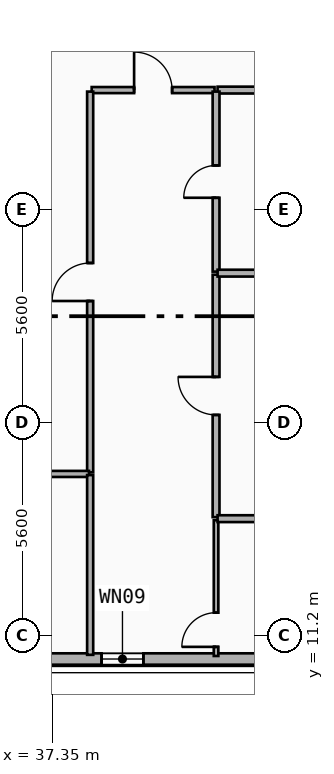
"""IFC4 building model, lengths in metres.
Left out: names, types, materials, properties, quantities, classifications, styles, units other than length and angle.
Written with IfcOpenShell. Run it as: python <this file> out.ifc"""

import sys

from ifc_helpers import new_model, si_unit, direction, frame, frame_2d, origin, place, context, subcontext, project, spatial, rectangle, extrude, element, fill, save


model = new_model("IFC4")
c1 = context("Model", 3, precision=1e-05, world=origin(), true_north=direction((0.0, 1.0)))
c2 = subcontext(c1, "Body", "Model", "MODEL_VIEW")
j1 = project(units=[si_unit("LENGTHUNIT", "METRE"), si_unit("PLANEANGLEUNIT", "RADIAN")], contexts=[c1])
p1 = place(None, origin())
s1 = spatial("IfcSite", under=j1, at=p1, CompositionType="ELEMENT")
p2 = place(p1, origin())
s2 = spatial("IfcBuilding", under=s1, at=p2, CompositionType="ELEMENT")
p3 = place(p2, frame((0.0, 0.0, 144.8)))
s3 = spatial("IfcBuildingStorey", under=s2, at=p3, CompositionType="ELEMENT", Elevation=144.8)
p4 = place(p3, frame((48.0, 10.58, 0.0), z_axis=(0.0, 0.0, 1.0), x_axis=(-1.0, 0.0, 0.0)))
e1 = element("IfcWall", 1, at=p4, inside=s3, PredefinedType="SOLIDWALL", context=c2, shape_type="SweptSolid", body=[
    extrude(rectangle(XDim=38.4, YDim=0.3, at=frame_2d((19.2, 0.0))), origin(), (0.0, 0.0, 1.0), 3.29),
])
p5 = place(p4, frame((36.19, 0.0, 0.34)))
e2 = element("IfcOpeningElement", 2, at=p5, cuts=e1, PredefinedType="OPENING", context=c2, shape_type="SweptSolid", body=[
    extrude(rectangle(XDim=1.8, YDim=1.8, at=frame_2d((0.9, 0.9))), frame((0.0, 0.16, 0.0), z_axis=(0.0, -1.0, 0.0), x_axis=(1.0, 0.0, 0.0)), (0.0, 0.0, 1.0), 0.32),
])
p6 = place(p4, frame((27.938, 0.0, 0.34)))
e3 = element("IfcOpeningElement", 3, at=p6, cuts=e1, PredefinedType="OPENING", context=c2, shape_type="SweptSolid", body=[
    extrude(rectangle(XDim=1.2, YDim=1.5, at=frame_2d((0.6, 0.75))), frame((0.0, 0.16, 0.0), z_axis=(0.0, -1.0, 0.0), x_axis=(1.0, 0.0, 0.0)), (0.0, 0.0, 1.0), 0.32),
])
p7 = place(p4, frame((25.719, 0.0, 0.34)))
e4 = element("IfcOpeningElement", 4, at=p7, cuts=e1, PredefinedType="OPENING", context=c2, shape_type="SweptSolid", body=[
    extrude(rectangle(XDim=1.4, YDim=1.8, at=frame_2d((0.7, 0.9))), frame((0.0, 0.16, 0.0), z_axis=(0.0, -1.0, 0.0), x_axis=(1.0, 0.0, 0.0)), (0.0, 0.0, 1.0), 0.32),
])
p8 = place(p4, frame((33.861, 0.0, 1.22)))
e5 = element("IfcOpeningElement", 5, at=p8, cuts=e1, PredefinedType="OPENING", context=c2, shape_type="SweptSolid", body=[
    extrude(rectangle(XDim=1.2, YDim=1.5, at=frame_2d((0.6, 0.75))), frame((0.0, 0.16, 0.0), z_axis=(0.0, -1.0, 0.0), x_axis=(1.0, 0.0, 0.0)), (0.0, 0.0, 1.0), 0.32),
])
p9 = place(p4, frame((20.1, 0.0, 0.65)))
e6 = element("IfcOpeningElement", 6, at=p9, cuts=e1, PredefinedType="OPENING", context=c2, shape_type="SweptSolid", body=[
    extrude(rectangle(XDim=2.1, YDim=2.1, at=frame_2d((1.05, 1.05))), frame((0.0, 0.16, 0.0), z_axis=(0.0, -1.0, 0.0), x_axis=(1.0, 0.0, 0.0)), (0.0, 0.0, 1.0), 0.32),
])
p10 = place(p4, frame((22.95, 0.0, 0.8)))
e7 = element("IfcOpeningElement", 7, at=p10, cuts=e1, PredefinedType="OPENING", context=c2, shape_type="SweptSolid", body=[
    extrude(rectangle(XDim=1.8, YDim=1.8, at=frame_2d((0.9, 0.9))), frame((0.0, 0.16, 0.0), z_axis=(0.0, -1.0, 0.0), x_axis=(1.0, 0.0, 0.0)), (0.0, 0.0, 1.0), 0.32),
])
p11 = place(p4, frame((13.35, 0.0, 0.65)))
e8 = element("IfcOpeningElement", 8, at=p11, cuts=e1, PredefinedType="OPENING", context=c2, shape_type="SweptSolid", body=[
    extrude(rectangle(XDim=2.1, YDim=2.1, at=frame_2d((1.05, 1.05))), frame((0.0, 0.16, 0.0), z_axis=(0.0, -1.0, 0.0), x_axis=(1.0, 0.0, 0.0)), (0.0, 0.0, 1.0), 0.32),
])
p12 = place(p4, frame((8.25, 0.0, 1.68)))
e9 = element("IfcOpeningElement", 9, at=p12, cuts=e1, PredefinedType="OPENING", context=c2, shape_type="SweptSolid", body=[
    extrude(rectangle(XDim=1.1, YDim=1.05, at=frame_2d((0.55, 0.525))), frame((0.0, 0.16, 0.0), z_axis=(0.0, -1.0, 0.0), x_axis=(1.0, 0.0, 0.0)), (0.0, 0.0, 1.0), 0.32),
])
p13 = place(p4, frame((2.9, 0.0, 0.34)))
e10 = element("IfcOpeningElement", 10, at=p13, cuts=e1, PredefinedType="OPENING", context=c2, shape_type="SweptSolid", body=[
    extrude(rectangle(XDim=1.4, YDim=1.8, at=frame_2d((0.7, 0.9))), frame((0.0, 0.16, 0.0), z_axis=(0.0, -1.0, 0.0), x_axis=(1.0, 0.0, 0.0)), (0.0, 0.0, 1.0), 0.32),
])
p14 = place(p4, frame((0.41, 0.0, 0.34)))
e11 = element("IfcOpeningElement", 11, at=p14, cuts=e1, PredefinedType="OPENING", context=c2, shape_type="SweptSolid", body=[
    extrude(rectangle(XDim=1.8, YDim=1.8, at=frame_2d((0.9, 0.9))), frame((0.0, 0.16, 0.0), z_axis=(0.0, -1.0, 0.0), x_axis=(1.0, 0.0, 0.0)), (0.0, 0.0, 1.0), 0.32),
])
p15 = place(p3, frame((38.39, 25.55, 0.0), z_axis=(0.0, 0.0, 1.0), x_axis=(1.0, 0.0, 0.0)))
e12 = element("IfcWall", 12, at=p15, inside=s3, PredefinedType="PARTITIONING", context=c2, shape_type="SweptSolid", body=[
    extrude(rectangle(XDim=3.233, YDim=0.16, at=frame_2d((1.617, 0.0))), origin(), (0.0, 0.0, 1.0), 3.29),
])
p16 = place(p15, frame((1.116, 0.0, 0.0)))
e13 = element("IfcOpeningElement", 13, at=p16, cuts=e12, PredefinedType="OPENING", context=c2, shape_type="SweptSolid", body=[
    extrude(rectangle(XDim=1.0, YDim=2.15, at=frame_2d((0.5, 1.075))), frame((0.0, 0.09, 0.0), z_axis=(0.0, -1.0, 0.0), x_axis=(1.0, 0.0, 0.0)), (0.0, 0.0, 1.0), 0.18),
])
p17 = place(p3, frame((41.703, 25.55, 0.0), z_axis=(0.0, 0.0, 1.0), x_axis=(1.0, 0.0, 0.0)))
e14 = element("IfcWall", 14, at=p17, inside=s3, PredefinedType="PLUMBINGWALL", context=c2, shape_type="SweptSolid", body=[
    extrude(rectangle(XDim=3.657, YDim=0.18, at=frame_2d((1.829, 0.0))), origin(), (0.0, 0.0, 1.0), 2.36),
])
p18 = place(p3, frame((38.35, 15.49, 0.0), z_axis=(0.0, 0.0, 1.0), x_axis=(0.0, 1.0, 0.0)))
e15 = element("IfcWall", 15, at=p18, inside=s3, PredefinedType="PARTITIONING", context=c2, shape_type="SweptSolid", body=[
    extrude(rectangle(XDim=10.02, YDim=0.16, at=frame_2d((5.01, 0.0))), origin(), (0.0, 0.0, 1.0), 2.72),
])
p19 = place(p18, frame((4.51, 0.0, 0.0)))
e16 = element("IfcOpeningElement", 16, at=p19, cuts=e15, PredefinedType="OPENING", context=c2, shape_type="SweptSolid", body=[
    extrude(rectangle(XDim=1.0, YDim=2.15, at=frame_2d((0.5, 1.075))), frame((0.0, 0.09, 0.0), z_axis=(0.0, -1.0, 0.0), x_axis=(1.0, 0.0, 0.0)), (0.0, 0.0, 1.0), 0.18),
])
p20 = place(p3, frame((41.663, 10.66, 0.0), z_axis=(0.0, 0.0, 1.0), x_axis=(0.0, 1.0, 0.0)))
e17 = element("IfcWall", 17, at=p20, inside=s3, PredefinedType="PARTITIONING", context=c2, shape_type="SweptSolid", body=[
    extrude(rectangle(XDim=3.573, YDim=0.12, at=frame_2d((1.787, 0.0))), origin(), (0.0, 0.0, 1.0), 2.91),
])
p21 = place(p20, frame((0.24, 0.0, 0.0)))
e18 = element("IfcOpeningElement", 18, at=p21, cuts=e17, PredefinedType="OPENING", context=c2, shape_type="SweptSolid", body=[
    extrude(rectangle(XDim=0.9, YDim=2.1, at=frame_2d((0.45, 1.05))), frame((0.0, 0.07, 0.0), z_axis=(0.0, -1.0, 0.0), x_axis=(1.0, 0.0, 0.0)), (0.0, 0.0, 1.0), 0.14),
])
p22 = place(p3, frame((41.663, 14.313, 0.0), z_axis=(0.0, 0.0, 1.0), x_axis=(0.0, 1.0, 0.0)))
e19 = element("IfcWall", 19, at=p22, inside=s3, PredefinedType="PLUMBINGWALL", context=c2, shape_type="SweptSolid", body=[
    extrude(rectangle(XDim=6.38, YDim=0.18, at=frame_2d((3.19, 0.0))), origin(), (0.0, 0.0, 1.0), 2.72),
])
p23 = place(p22, frame((2.69, 0.0, 0.0)))
e20 = element("IfcOpeningElement", 20, at=p23, cuts=e19, PredefinedType="OPENING", context=c2, shape_type="SweptSolid", body=[
    extrude(rectangle(XDim=1.0, YDim=2.15, at=frame_2d((0.5, 1.075))), frame((0.0, 0.1, 0.0), z_axis=(0.0, -1.0, 0.0), x_axis=(1.0, 0.0, 0.0)), (0.0, 0.0, 1.0), 0.2),
])
p24 = place(p3, frame((41.663, 20.773, 0.0), z_axis=(0.0, 0.0, 1.0), x_axis=(0.0, 1.0, 0.0)))
e21 = element("IfcWall", 21, at=p24, inside=s3, PredefinedType="PLUMBINGWALL", context=c2, shape_type="SweptSolid", body=[
    extrude(rectangle(XDim=4.737, YDim=0.18, at=frame_2d((2.369, 0.0))), origin(), (0.0, 0.0, 1.0), 2.88),
])
p25 = place(p24, frame((1.944, 0.0, 0.0)))
e22 = element("IfcOpeningElement", 22, at=p25, cuts=e21, PredefinedType="OPENING", context=c2, shape_type="SweptSolid", body=[
    extrude(rectangle(XDim=0.85, YDim=2.1, at=frame_2d((0.425, 1.05))), frame((0.0, 0.1, 0.0), z_axis=(0.0, -1.0, 0.0), x_axis=(1.0, 0.0, 0.0)), (0.0, 0.0, 1.0), 0.2),
])
for number, where, z_axis, x_axis in (
    (23, (41.703, 14.273, 0.0), (0.0, 0.0, 1.0), (1.0, 0.0, 0.0)),
    (24, (41.703, 20.733, 0.0), (0.0, 0.0, 1.0), (1.0, 0.0, 0.0)),
):
    element("IfcWall", number, at=place(p3, frame(where, z_axis=z_axis, x_axis=x_axis)), inside=s3, PredefinedType="PLUMBINGWALL", context=c2, shape_type="SweptSolid", body=[
        extrude(rectangle(XDim=3.657, YDim=0.18, at=frame_2d((1.829, 0.0))), origin(), (0.0, 0.0, 1.0), 2.36),
    ])
p26 = place(p3, frame((36.38, 15.45, 0.0), z_axis=(0.0, 0.0, 1.0), x_axis=(1.0, 0.0, 0.0)))
e25 = element("IfcWall", 25, at=p26, inside=s3, PredefinedType="PARTITIONING", context=c2, shape_type="SweptSolid", body=[
    extrude(rectangle(XDim=1.94, YDim=0.16, at=frame_2d((0.97, 0.0))), origin(), (0.0, 0.0, 1.0), 2.36),
])
p27 = place(p3, frame((38.35, 10.69, 0.0), z_axis=(0.0, 0.0, 1.0), x_axis=(0.0, 1.0, 0.0)))
e26 = element("IfcWall", 26, at=p27, inside=s3, PredefinedType="PARTITIONING", context=c2, shape_type="SweptSolid", body=[
    extrude(rectangle(XDim=4.73, YDim=0.16, at=frame_2d((2.365, 0.0))), origin(), (0.0, 0.0, 1.0), 2.91),
])
p28 = place(p12, origin())
e27 = element("IfcWindow", 27, at=p28, inside=s3, PartitioningType="SINGLE_PANEL", PredefinedType="WINDOW", context=c2, shape_type="SweptSolid", body=[
    extrude(rectangle(XDim=1.1, YDim=1.05, at=frame_2d((0.55, 0.525))), frame((0.0, 0.03, 0.0), z_axis=(0.0, -1.0, 0.0), x_axis=(1.0, 0.0, 0.0)), (0.0, 0.0, 1.0), 0.06),
])
fill(e9, e27)
p29 = place(p16, origin())
e28 = element("IfcDoor", 28, at=p29, inside=s3, OperationType="SINGLE_SWING_LEFT", PredefinedType="DOOR", context=c2, shape_type="SweptSolid", body=[
    extrude(rectangle(XDim=1.0, YDim=2.15, at=frame_2d((0.5, 1.075))), frame((0.0, 0.025, 0.0), z_axis=(0.0, -1.0, 0.0), x_axis=(1.0, 0.0, 0.0)), (0.0, 0.0, 1.0), 0.05),
])
fill(e13, e28)
p30 = place(p19, origin())
e29 = element("IfcDoor", 29, at=p30, inside=s3, OperationType="SINGLE_SWING_LEFT", PredefinedType="DOOR", context=c2, shape_type="SweptSolid", body=[
    extrude(rectangle(XDim=1.0, YDim=2.15, at=frame_2d((0.5, 1.075))), frame((0.0, 0.025, 0.0), z_axis=(0.0, -1.0, 0.0), x_axis=(1.0, 0.0, 0.0)), (0.0, 0.0, 1.0), 0.05),
])
fill(e16, e29)
p31 = place(p21, origin())
e30 = element("IfcDoor", 30, at=p31, inside=s3, OperationType="SINGLE_SWING_LEFT", PredefinedType="DOOR", context=c2, shape_type="SweptSolid", body=[
    extrude(rectangle(XDim=0.9, YDim=2.1, at=frame_2d((0.45, 1.05))), frame((0.0, 0.025, 0.0), z_axis=(0.0, -1.0, 0.0), x_axis=(1.0, 0.0, 0.0)), (0.0, 0.0, 1.0), 0.05),
])
fill(e18, e30)
p32 = place(p23, origin())
e31 = element("IfcDoor", 31, at=p32, inside=s3, OperationType="SINGLE_SWING_RIGHT", PredefinedType="DOOR", context=c2, shape_type="SweptSolid", body=[
    extrude(rectangle(XDim=1.0, YDim=2.15, at=frame_2d((0.5, 1.075))), frame((0.0, 0.025, 0.0), z_axis=(0.0, -1.0, 0.0), x_axis=(1.0, 0.0, 0.0)), (0.0, 0.0, 1.0), 0.05),
])
fill(e20, e31)
p33 = place(p25, origin())
e32 = element("IfcDoor", 32, at=p33, inside=s3, OperationType="SINGLE_SWING_LEFT", PredefinedType="DOOR", context=c2, shape_type="SweptSolid", body=[
    extrude(rectangle(XDim=0.85, YDim=2.1, at=frame_2d((0.425, 1.05))), frame((0.0, 0.025, 0.0), z_axis=(0.0, -1.0, 0.0), x_axis=(1.0, 0.0, 0.0)), (0.0, 0.0, 1.0), 0.05),
])
fill(e22, e32)
save(model, sys.argv[1])
